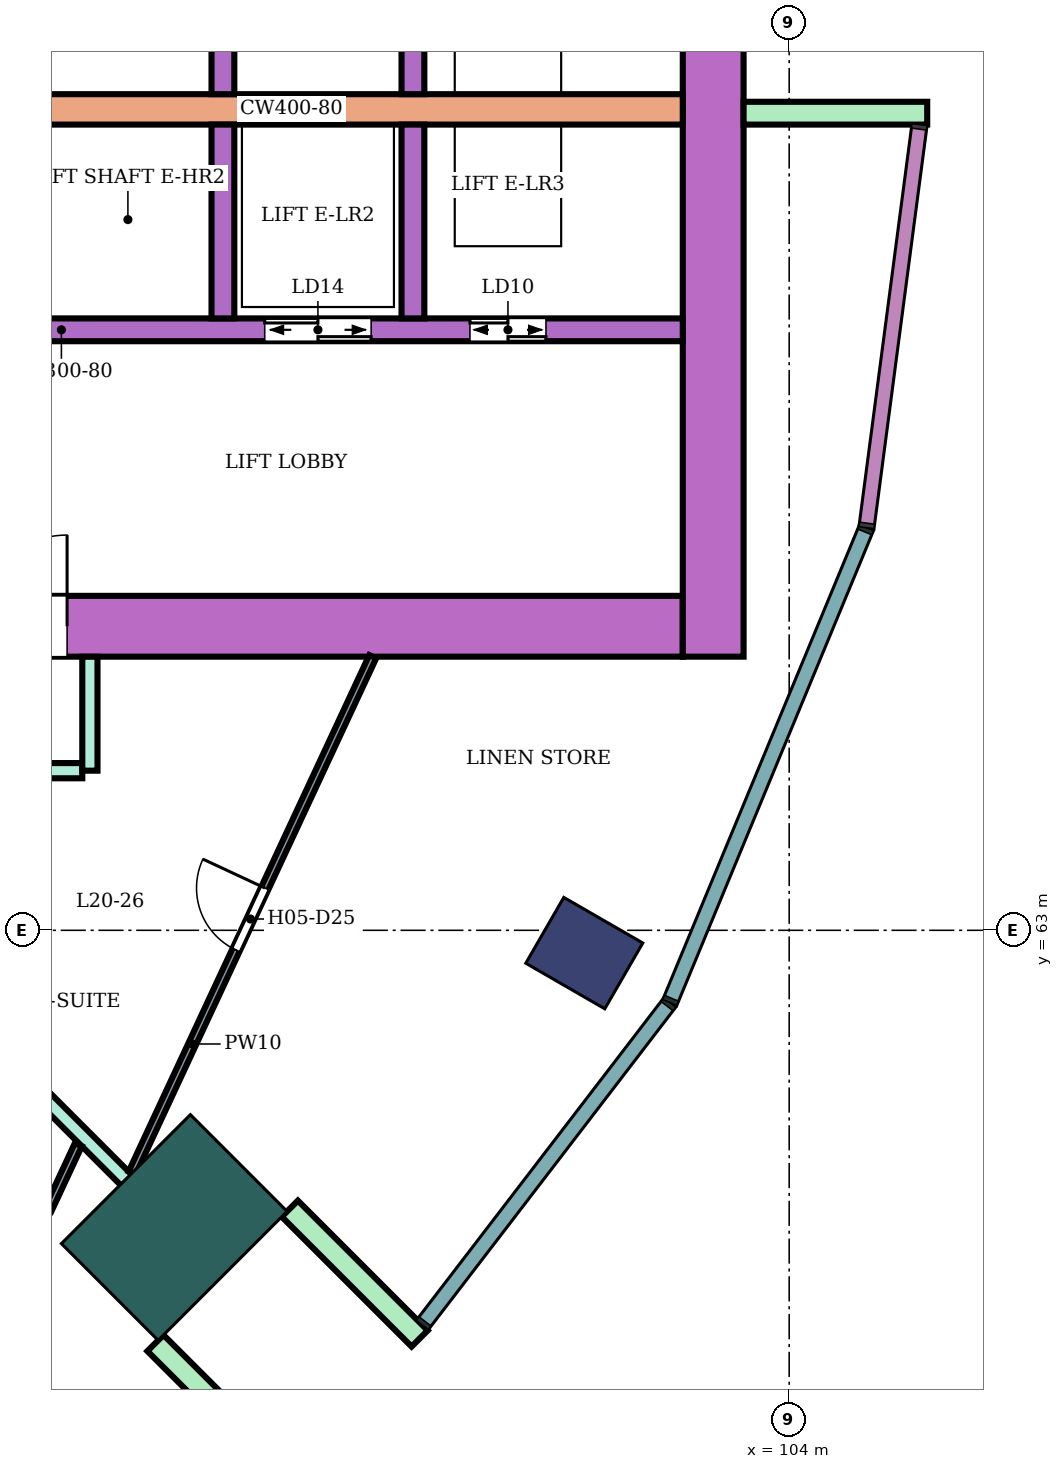
"""IFC4 building model, lengths in metres.
Left out: names, types, materials, properties, quantities, classifications, styles, units other than length and angle.
Written with IfcOpenShell. Run it as: python <this file> out.ifc"""

import sys

from ifc_helpers import new_model, si_unit, direction, frame, frame_2d, origin, origin_2d, place, context, subcontext, project, spatial, rectangle, extrude, element, fill, save


model = new_model("IFC4")
c1 = context("Model", 3, precision=1e-05, world=origin(), true_north=direction((0.0, 1.0)))
c2 = subcontext(c1, "Body", "Model", "MODEL_VIEW")
j1 = project(units=[si_unit("LENGTHUNIT", "METRE"), si_unit("PLANEANGLEUNIT", "RADIAN")], contexts=[c1])
p1 = place(None, origin())
s1 = spatial("IfcSite", under=j1, at=p1, CompositionType="ELEMENT")
p2 = place(p1, origin())
s2 = spatial("IfcBuilding", under=s1, at=p2, CompositionType="ELEMENT")
p3 = place(p2, frame((0.0, 0.0, 90.0)))
s3 = spatial("IfcBuildingStorey", under=s2, at=p3, CompositionType="ELEMENT", Elevation=90.0)
p4 = place(p3, frame((101.304, 62.7, 0.0), z_axis=(0.0, 0.0, 1.0), x_axis=(0.866025403784, -0.5, 0.0)))
e1 = element("IfcColumn", 1, at=p4, inside=s3, PredefinedType="COLUMN", context=c2, shape_type="SweptSolid", body=[
    extrude(rectangle(XDim=1.2, YDim=1.0, at=origin_2d()), origin(), (0.0, 0.0, 1.0), 3.8),
])
p5 = place(p3, frame((95.91, 59.09, 0.0), z_axis=(0.0, 0.0, 1.0), x_axis=(0.707106781187, -0.707106781187, 0.0)))
e2 = element("IfcColumn", 2, at=p5, inside=s3, PredefinedType="COLUMN", context=c2, shape_type="SweptSolid", body=[
    extrude(rectangle(XDim=1.8, YDim=2.4, at=origin_2d()), origin(), (0.0, 0.0, 1.0), 3.8),
])
p6 = place(p3, frame((87.9, 67.0, 0.0), z_axis=(0.0, 0.0, 1.0), x_axis=(1.0, 0.0, 0.0)))
e3 = element("IfcWall", 3, at=p6, inside=s3, PredefinedType="SHEAR", context=c2, shape_type="SweptSolid", body=[
    extrude(rectangle(XDim=14.7, YDim=0.8, at=frame_2d((7.35, 0.0))), origin(), (0.0, 0.0, 1.0), 3.48),
])
p7 = place(p6, frame((4.2, 0.0, 0.0)))
e4 = element("IfcOpeningElement", 4, at=p7, cuts=e3, PredefinedType="OPENING", context=c2, shape_type="SweptSolid", body=[
    extrude(rectangle(XDim=2.4, YDim=2.4, at=frame_2d((1.2, 1.2))), frame((0.0, 0.41, 0.0), z_axis=(0.0, -1.0, 0.0), x_axis=(1.0, 0.0, 0.0)), (0.0, 0.0, 1.0), 0.82),
])
p8 = place(p3, frame((103.0, 66.6, 0.0), z_axis=(0.0, 0.0, 1.0), x_axis=(0.0, 1.0, 0.0)))
e5 = element("IfcWall", 5, at=p8, inside=s3, PredefinedType="SHEAR", context=c2, shape_type="SweptSolid", body=[
    extrude(rectangle(XDim=16.8, YDim=0.8, at=frame_2d((8.4, 0.0))), origin(), (0.0, 0.0, 1.0), 3.48),
])
p9 = place(p3, frame((91.7, 73.8, 0.0), z_axis=(0.0, 0.0, 1.0), x_axis=(1.0, 0.0, 0.0)))
e6 = element("IfcWall", 6, at=p9, inside=s3, PredefinedType="SHEAR", context=c2, shape_type="SweptSolid", body=[
    extrude(rectangle(XDim=10.9, YDim=0.4, at=frame_2d((5.45, 0.0))), origin(), (0.0, 0.0, 1.0), 3.48),
])
p10 = place(p3, frame((91.7, 70.9, 0.0), z_axis=(0.0, 0.0, 1.0), x_axis=(1.0, 0.0, 0.0)))
e7 = element("IfcWall", 7, at=p10, inside=s3, PredefinedType="SHEAR", context=c2, shape_type="SweptSolid", body=[
    extrude(rectangle(XDim=10.9, YDim=0.3, at=frame_2d((5.45, 0.0))), origin(), (0.0, 0.0, 1.0), 3.48),
])
p11 = place(p10, frame((0.4, 0.0, 0.0)))
e8 = element("IfcOpeningElement", 8, at=p11, cuts=e7, PredefinedType="OPENING", context=c2, shape_type="SweptSolid", body=[
    extrude(rectangle(XDim=1.4, YDim=2.1, at=frame_2d((0.7, 1.05))), frame((0.0, 0.16, 0.0), z_axis=(0.0, -1.0, 0.0), x_axis=(1.0, 0.0, 0.0)), (0.0, 0.0, 1.0), 0.32),
])
p12 = place(p10, frame((5.4, 0.0, 0.0)))
e9 = element("IfcOpeningElement", 9, at=p12, cuts=e7, PredefinedType="OPENING", context=c2, shape_type="SweptSolid", body=[
    extrude(rectangle(XDim=1.4, YDim=2.1, at=frame_2d((0.7, 1.05))), frame((0.0, 0.16, 0.0), z_axis=(0.0, -1.0, 0.0), x_axis=(1.0, 0.0, 0.0)), (0.0, 0.0, 1.0), 0.32),
])
p13 = place(p10, frame((8.1, 0.0, 0.0)))
e10 = element("IfcOpeningElement", 10, at=p13, cuts=e7, PredefinedType="OPENING", context=c2, shape_type="SweptSolid", body=[
    extrude(rectangle(XDim=1.0, YDim=2.1, at=frame_2d((0.5, 1.05))), frame((0.0, 0.16, 0.0), z_axis=(0.0, -1.0, 0.0), x_axis=(1.0, 0.0, 0.0)), (0.0, 0.0, 1.0), 0.32),
])
for number, where, z_axis, x_axis in (
    (11, (96.55, 74.0, 0.0), (0.0, 0.0, 1.0), (0.0, 1.0, 0.0)),
    (12, (99.05, 74.0, 0.0), (0.0, 0.0, 1.0), (0.0, 1.0, 0.0)),
    (13, (96.55, 71.05, 0.0), (0.0, 0.0, 1.0), (0.0, 1.0, 0.0)),
    (14, (99.05, 71.05, 0.0), (0.0, 0.0, 1.0), (0.0, 1.0, 0.0)),
):
    element("IfcWall", number, at=place(p3, frame(where, z_axis=z_axis, x_axis=x_axis)), inside=s3, PredefinedType="SHEAR", context=c2, shape_type="SweptSolid", body=[
        extrude(rectangle(XDim=2.55, YDim=0.3, at=frame_2d((1.275, 0.0))), origin(), (0.0, 0.0, 1.0), 3.48),
    ])
for number, where, z_axis, x_axis in (
    (15, (103.4, 73.75, 0.0), (0.0, 0.0, 1.0), (1.0, 0.0, 0.0)),
    (16, (95.662, 57.57, 0.0), (0.0, 0.0, 1.0), (0.707, -0.707, 0.0)),
    (17, (97.43, 59.338, 0.0), (0.0, 0.0, 1.0), (0.707, -0.707, 0.0)),
):
    element("IfcWall", number, at=place(p3, frame(where, z_axis=z_axis, x_axis=x_axis)), inside=s3, PredefinedType="NOTDEFINED", context=c2, shape_type="SweptSolid", body=[
        extrude(rectangle(XDim=2.416, YDim=0.3, at=frame_2d((1.208, 0.0))), origin(), (0.0, 0.0, 1.0), 3.8),
    ])
p14 = place(p3, frame((92.692, 62.303, 0.0), z_axis=(0.0, 0.0, 1.0), x_axis=(0.706920663731, -0.707292849667, 0.0)))
e18 = element("IfcWall", 18, at=p14, inside=s3, PredefinedType="PARTITIONING", context=c2, shape_type="SweptSolid", body=[
    extrude(rectangle(XDim=5.248, YDim=0.2, at=frame_2d((2.624, 0.0))), origin(), (0.0, 0.0, 1.0), 3.35),
])
p15 = place(p3, frame((93.851, 65.1, 0.0), z_axis=(0.0, 0.0, 1.0), x_axis=(1.0, 0.0, 0.0)))
e19 = element("IfcWall", 19, at=p15, inside=s3, PredefinedType="PARTITIONING", context=c2, shape_type="SweptSolid", body=[
    extrude(rectangle(XDim=0.849, YDim=0.2, at=frame_2d((0.424, 0.0))), origin(), (0.0, 0.0, 1.0), 3.35),
])
p16 = place(p3, frame((94.8, 65.1, 0.0), z_axis=(0.0, 0.0, 1.0), x_axis=(0.0, 1.0, 0.0)))
e20 = element("IfcWall", 20, at=p16, inside=s3, PredefinedType="PARTITIONING", context=c2, shape_type="SweptSolid", body=[
    extrude(rectangle(XDim=1.499, YDim=0.2, at=frame_2d((0.75, 0.0))), origin(), (0.0, 0.0, 1.0), 3.35),
])
p17 = place(p3, frame((94.247, 59.32, 0.0), z_axis=(0.0, 0.0, 1.0), x_axis=(0.422660124657, 0.906288264861, 0.0)))
e21 = element("IfcWall", 21, at=p17, inside=s3, PredefinedType="PARTITIONING", context=c2, shape_type="SweptSolid", body=[
    extrude(rectangle(XDim=0.949, YDim=0.1, at=frame_2d((0.475, 0.0))), origin(), (0.0, 0.0, 1.0), 3.35),
])
p18 = place(p3, frame((95.355, 59.806, 0.0), z_axis=(0.0, 0.0, 1.0), x_axis=(0.422407546544, 0.906406015328, 0.0)))
e22 = element("IfcWall", 22, at=p18, inside=s3, PredefinedType="PARTITIONING", context=c2, shape_type="SweptSolid", body=[
    extrude(rectangle(XDim=7.496, YDim=0.1, at=frame_2d((3.748, 0.0))), origin(), (0.0, 0.0, 1.0), 3.35),
])
p19 = place(p18, frame((3.238, 0.0, 0.0)))
e23 = element("IfcOpeningElement", 23, at=p19, cuts=e22, PredefinedType="OPENING", context=c2, shape_type="SweptSolid", body=[
    extrude(rectangle(XDim=0.9, YDim=2.1, at=frame_2d((0.45, 1.05))), frame((0.0, 0.06, 0.0), z_axis=(0.0, -1.0, 0.0), x_axis=(1.0, 0.0, 0.0)), (0.0, 0.0, 1.0), 0.12),
])
p20 = place(p19, origin())
e24 = element("IfcDoor", 24, at=p20, inside=s3, OperationType="SINGLE_SWING_RIGHT", PredefinedType="DOOR", context=c2, shape_type="SweptSolid", body=[
    extrude(rectangle(XDim=0.9, YDim=2.1, at=frame_2d((0.45, 1.05))), frame((0.0, 0.025, 0.0), z_axis=(0.0, -1.0, 0.0), x_axis=(1.0, 0.0, 0.0)), (0.0, 0.0, 1.0), 0.05),
])
fill(e23, e24)
p21 = place(p12, origin())
e25 = element("IfcDoor", 25, at=p21, inside=s3, OperationType="DOUBLE_DOOR_SLIDING", PredefinedType="DOOR", context=c2, shape_type="SweptSolid", body=[
    extrude(rectangle(XDim=1.4, YDim=2.1, at=frame_2d((0.7, 1.05))), frame((0.0, 0.025, 0.0), z_axis=(0.0, -1.0, 0.0), x_axis=(1.0, 0.0, 0.0)), (0.0, 0.0, 1.0), 0.05),
])
fill(e9, e25)
p22 = place(p13, origin())
e26 = element("IfcDoor", 26, at=p22, inside=s3, OperationType="DOUBLE_DOOR_SLIDING", PredefinedType="DOOR", context=c2, shape_type="SweptSolid", body=[
    extrude(rectangle(XDim=1.0, YDim=2.1, at=frame_2d((0.5, 1.05))), frame((0.0, 0.025, 0.0), z_axis=(0.0, -1.0, 0.0), x_axis=(1.0, 0.0, 0.0)), (0.0, 0.0, 1.0), 0.05),
])
fill(e10, e26)
p23 = place(p7, origin())
e27 = element("IfcDoor", 27, at=p23, inside=s3, OperationType="DOUBLE_DOOR_SINGLE_SWING", PredefinedType="DOOR", context=c2, shape_type="SweptSolid", body=[
    extrude(rectangle(XDim=2.4, YDim=2.4, at=frame_2d((1.2, 1.2))), frame((0.0, 0.025, 0.0), z_axis=(0.0, -1.0, 0.0), x_axis=(1.0, 0.0, 0.0)), (0.0, 0.0, 1.0), 0.05),
])
fill(e4, e27)
save(model, sys.argv[1])
